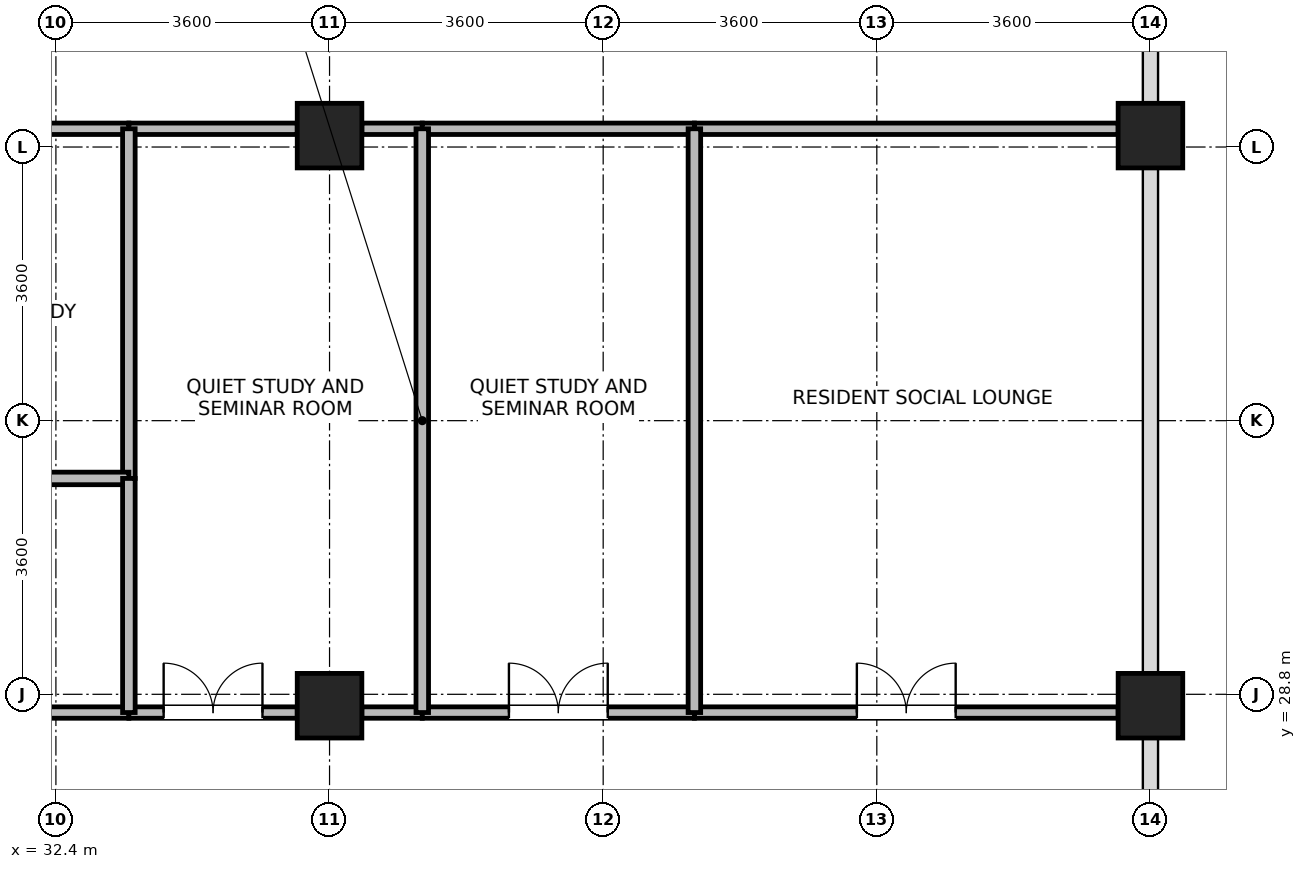
"""IFC4 building model, lengths in metres.
Left out: names, types, materials, properties, quantities, classifications, styles, units other than length and angle.
Written with IfcOpenShell. Run it as: python <this file> out.ifc"""

import sys

from ifc_helpers import new_model, si_unit, direction, frame, frame_2d, origin, origin_2d, place, context, subcontext, project, spatial, rectangle, extrude, source, transform, mapped, element, fill, save


model = new_model("IFC4")
c1 = context("Model", 3, precision=1e-05, world=origin(), true_north=direction((0.0, 1.0)))
c2 = subcontext(c1, "Body", "Model", "MODEL_VIEW")
j1 = project(units=[si_unit("LENGTHUNIT", "METRE"), si_unit("PLANEANGLEUNIT", "RADIAN")], contexts=[c1])
p1 = place(None, origin())
s1 = spatial("IfcSite", under=j1, at=p1, CompositionType="ELEMENT")
p2 = place(p1, origin())
s2 = spatial("IfcBuilding", under=s1, at=p2, CompositionType="ELEMENT")
p3 = place(p2, frame((0.0, 0.0, 272.1)))
s3 = spatial("IfcBuildingStorey", under=s2, at=p3, CompositionType="ELEMENT", Elevation=272.1)
m1 = source(origin(), c2, "Body", "SweptSolid", [
    extrude(rectangle(XDim=0.85, YDim=0.85, at=origin_2d()), origin(), (0.0, 0.0, 1.0), 3.7),
])
for number, where, z_axis, x_axis in (
    (1, (36.0, 28.65, 0.0), (0.0, 0.0, 1.0), (1.0, 0.0, 0.0)),
    (2, (36.0, 36.15, 0.0), (0.0, 0.0, 1.0), (1.0, 0.0, 0.0)),
    (3, (46.8, 28.65, 0.0), (0.0, 0.0, 1.0), (1.0, 0.0, 0.0)),
    (4, (46.8, 36.15, 0.0), (0.0, 0.0, 1.0), (1.0, 0.0, 0.0)),
):
    element("IfcColumn", number, at=place(p3, frame(where, z_axis=z_axis, x_axis=x_axis)), inside=s3, PredefinedType="COLUMN", context=c2, shape_type="MappedRepresentation", body=[
        mapped(m1, transform((0.0, 0.0, 0.0), x_axis=(1.0, 0.0, 0.0), y_axis=(0.0, 1.0, 0.0), z_axis=(0.0, 0.0, 1.0), scale=1.0)),
    ])
p4 = place(p3, frame((40.8, 28.56, 0.0), z_axis=(0.0, 0.0, 1.0), x_axis=(1.0, 0.0, 0.0)))
e5 = element("IfcWall", 5, at=p4, inside=s3, PredefinedType="PARTITIONING", context=c2, shape_type="SweptSolid", body=[
    extrude(rectangle(XDim=5.575, YDim=0.15, at=frame_2d((2.788, 0.0))), origin(), (0.0, 0.0, 1.0), 2.905),
])
p5 = place(p4, frame((2.137, 0.0, 0.0)))
e6 = element("IfcOpeningElement", 6, at=p5, cuts=e5, PredefinedType="OPENING", context=c2, shape_type="SweptSolid", body=[
    extrude(rectangle(XDim=1.3, YDim=2.12, at=frame_2d((0.65, 1.06))), frame((0.0, 0.085, 0.0), z_axis=(0.0, -1.0, 0.0), x_axis=(1.0, 0.0, 0.0)), (0.0, 0.0, 1.0), 0.17),
])
p6 = place(p3, frame((40.8, 36.24, 0.0), z_axis=(0.0, 0.0, 1.0), x_axis=(1.0, 0.0, 0.0)))
e7 = element("IfcWall", 7, at=p6, inside=s3, PredefinedType="PARTITIONING", context=c2, shape_type="SweptSolid", body=[
    extrude(rectangle(XDim=5.575, YDim=0.15, at=frame_2d((2.788, 0.0))), origin(), (0.0, 0.0, 1.0), 2.905),
])
p7 = place(p3, frame((29.225, 28.56, 0.0), z_axis=(0.0, 0.0, 1.0), x_axis=(1.0, 0.0, 0.0)))
e8 = element("IfcWall", 8, at=p7, inside=s3, PredefinedType="PARTITIONING", context=c2, shape_type="SweptSolid", body=[
    extrude(rectangle(XDim=4.135, YDim=0.15, at=frame_2d((2.067, 0.0))), origin(), (0.0, 0.0, 1.0), 2.905),
])
p8 = place(p7, frame((1.637, 0.0, 0.0)))
e9 = element("IfcOpeningElement", 9, at=p8, cuts=e8, PredefinedType="OPENING", context=c2, shape_type="SweptSolid", body=[
    extrude(rectangle(XDim=0.86, YDim=2.02, at=frame_2d((0.43, 1.01))), frame((0.0, 0.085, 0.0), z_axis=(0.0, -1.0, 0.0), x_axis=(1.0, 0.0, 0.0)), (0.0, 0.0, 1.0), 0.17),
])
p9 = place(p3, frame((29.225, 36.24, 0.0), z_axis=(0.0, 0.0, 1.0), x_axis=(1.0, 0.0, 0.0)))
e10 = element("IfcWall", 10, at=p9, inside=s3, PredefinedType="PARTITIONING", context=c2, shape_type="SweptSolid", body=[
    extrude(rectangle(XDim=4.135, YDim=0.15, at=frame_2d((2.067, 0.0))), origin(), (0.0, 0.0, 1.0), 2.905),
])
p10 = place(p9, frame((1.417, 0.0, 0.0)))
e11 = element("IfcOpeningElement", 11, at=p10, cuts=e10, PredefinedType="OPENING", context=c2, shape_type="SweptSolid", body=[
    extrude(rectangle(XDim=1.3, YDim=2.12, at=frame_2d((0.65, 1.06))), frame((0.0, 0.085, 0.0), z_axis=(0.0, -1.0, 0.0), x_axis=(1.0, 0.0, 0.0)), (0.0, 0.0, 1.0), 0.17),
])
p11 = place(p3, frame((33.36, 28.56, 0.0), z_axis=(0.0, 0.0, 1.0), x_axis=(1.0, 0.0, 0.0)))
e12 = element("IfcWall", 12, at=p11, inside=s3, PredefinedType="PARTITIONING", context=c2, shape_type="SweptSolid", body=[
    extrude(rectangle(XDim=2.215, YDim=0.15, at=frame_2d((1.107, 0.0))), origin(), (0.0, 0.0, 1.0), 2.905),
])
p12 = place(p11, frame((0.458, 0.0, 0.0)))
e13 = element("IfcOpeningElement", 13, at=p12, cuts=e12, PredefinedType="OPENING", context=c2, shape_type="SweptSolid", body=[
    extrude(rectangle(XDim=1.3, YDim=2.12, at=frame_2d((0.65, 1.06))), frame((0.0, 0.085, 0.0), z_axis=(0.0, -1.0, 0.0), x_axis=(1.0, 0.0, 0.0)), (0.0, 0.0, 1.0), 0.17),
])
p13 = place(p3, frame((36.425, 28.56, 0.0), z_axis=(0.0, 0.0, 1.0), x_axis=(1.0, 0.0, 0.0)))
e14 = element("IfcWall", 14, at=p13, inside=s3, PredefinedType="PARTITIONING", context=c2, shape_type="SweptSolid", body=[
    extrude(rectangle(XDim=0.795, YDim=0.15, at=frame_2d((0.397, 0.0))), origin(), (0.0, 0.0, 1.0), 2.905),
])
p14 = place(p3, frame((33.36, 36.24, 0.0), z_axis=(0.0, 0.0, 1.0), x_axis=(1.0, 0.0, 0.0)))
e15 = element("IfcWall", 15, at=p14, inside=s3, PredefinedType="PARTITIONING", context=c2, shape_type="SweptSolid", body=[
    extrude(rectangle(XDim=2.215, YDim=0.15, at=frame_2d((1.107, 0.0))), origin(), (0.0, 0.0, 1.0), 2.905),
])
p15 = place(p3, frame((36.425, 36.24, 0.0), z_axis=(0.0, 0.0, 1.0), x_axis=(1.0, 0.0, 0.0)))
e16 = element("IfcWall", 16, at=p15, inside=s3, PredefinedType="PARTITIONING", context=c2, shape_type="SweptSolid", body=[
    extrude(rectangle(XDim=0.795, YDim=0.15, at=frame_2d((0.397, 0.0))), origin(), (0.0, 0.0, 1.0), 2.905),
])
p16 = place(p3, frame((37.22, 28.56, 0.0), z_axis=(0.0, 0.0, 1.0), x_axis=(1.0, 0.0, 0.0)))
e17 = element("IfcWall", 17, at=p16, inside=s3, PredefinedType="PARTITIONING", context=c2, shape_type="SweptSolid", body=[
    extrude(rectangle(XDim=3.58, YDim=0.15, at=frame_2d((1.79, 0.0))), origin(), (0.0, 0.0, 1.0), 2.905),
])
p17 = place(p16, frame((1.14, 0.0, 0.0)))
e18 = element("IfcOpeningElement", 18, at=p17, cuts=e17, PredefinedType="OPENING", context=c2, shape_type="SweptSolid", body=[
    extrude(rectangle(XDim=1.3, YDim=2.12, at=frame_2d((0.65, 1.06))), frame((0.0, 0.085, 0.0), z_axis=(0.0, -1.0, 0.0), x_axis=(1.0, 0.0, 0.0)), (0.0, 0.0, 1.0), 0.17),
])
p18 = place(p3, frame((37.22, 36.24, 0.0), z_axis=(0.0, 0.0, 1.0), x_axis=(1.0, 0.0, 0.0)))
e19 = element("IfcWall", 19, at=p18, inside=s3, PredefinedType="PARTITIONING", context=c2, shape_type="SweptSolid", body=[
    extrude(rectangle(XDim=3.58, YDim=0.15, at=frame_2d((1.79, 0.0))), origin(), (0.0, 0.0, 1.0), 2.905),
])
for number, where, z_axis, x_axis in (
    (20, (37.22, 28.56, 0.0), (0.0, 0.0, 1.0), (0.0, 1.0, 0.0)),
    (21, (40.8, 28.56, 0.0), (0.0, 0.0, 1.0), (0.0, 1.0, 0.0)),
):
    element("IfcWall", number, at=place(p3, frame(where, z_axis=z_axis, x_axis=x_axis)), inside=s3, PredefinedType="PARTITIONING", context=c2, shape_type="SweptSolid", body=[
        extrude(rectangle(XDim=7.68, YDim=0.165, at=frame_2d((3.84, 0.0))), origin(), (0.0, 0.0, 1.0), 3.455),
    ])
p19 = place(p3, frame((33.36, 31.64, 0.0), z_axis=(0.0, 0.0, 1.0), x_axis=(0.0, 1.0, 0.0)))
e22 = element("IfcWall", 22, at=p19, inside=s3, PredefinedType="PARTITIONING", context=c2, shape_type="SweptSolid", body=[
    extrude(rectangle(XDim=4.6, YDim=0.165, at=frame_2d((2.3, 0.0))), origin(), (0.0, 0.0, 1.0), 3.455),
])
p20 = place(p3, frame((28.84, 31.64, 0.0), z_axis=(0.0, 0.0, 1.0), x_axis=(1.0, 0.0, 0.0)))
e23 = element("IfcWall", 23, at=p20, inside=s3, PredefinedType="PARTITIONING", context=c2, shape_type="SweptSolid", body=[
    extrude(rectangle(XDim=4.52, YDim=0.165, at=frame_2d((2.26, 0.0))), origin(), (0.0, 0.0, 1.0), 3.455),
])
p21 = place(p3, frame((33.36, 28.56, 0.0), z_axis=(0.0, 0.0, 1.0), x_axis=(0.0, 1.0, 0.0)))
e24 = element("IfcWall", 24, at=p21, inside=s3, PredefinedType="PARTITIONING", context=c2, shape_type="SweptSolid", body=[
    extrude(rectangle(XDim=3.08, YDim=0.165, at=frame_2d((1.54, 0.0))), origin(), (0.0, 0.0, 1.0), 3.455),
])
p22 = place(p5, origin())
e25 = element("IfcDoor", 25, at=p22, inside=s3, OperationType="DOUBLE_DOOR_SINGLE_SWING", PredefinedType="DOOR", context=c2, shape_type="SweptSolid", body=[
    extrude(rectangle(XDim=1.3, YDim=2.12, at=frame_2d((0.65, 1.06))), frame((0.0, 0.025, 0.0), z_axis=(0.0, -1.0, 0.0), x_axis=(1.0, 0.0, 0.0)), (0.0, 0.0, 1.0), 0.05),
])
fill(e6, e25)
p23 = place(p12, origin())
e26 = element("IfcDoor", 26, at=p23, inside=s3, OperationType="DOUBLE_DOOR_SINGLE_SWING", PredefinedType="DOOR", context=c2, shape_type="SweptSolid", body=[
    extrude(rectangle(XDim=1.3, YDim=2.12, at=frame_2d((0.65, 1.06))), frame((0.0, 0.025, 0.0), z_axis=(0.0, -1.0, 0.0), x_axis=(1.0, 0.0, 0.0)), (0.0, 0.0, 1.0), 0.05),
])
fill(e13, e26)
p24 = place(p17, origin())
e27 = element("IfcDoor", 27, at=p24, inside=s3, OperationType="DOUBLE_DOOR_SINGLE_SWING", PredefinedType="DOOR", context=c2, shape_type="SweptSolid", body=[
    extrude(rectangle(XDim=1.3, YDim=2.12, at=frame_2d((0.65, 1.06))), frame((0.0, 0.025, 0.0), z_axis=(0.0, -1.0, 0.0), x_axis=(1.0, 0.0, 0.0)), (0.0, 0.0, 1.0), 0.05),
])
fill(e18, e27)
save(model, sys.argv[1])
